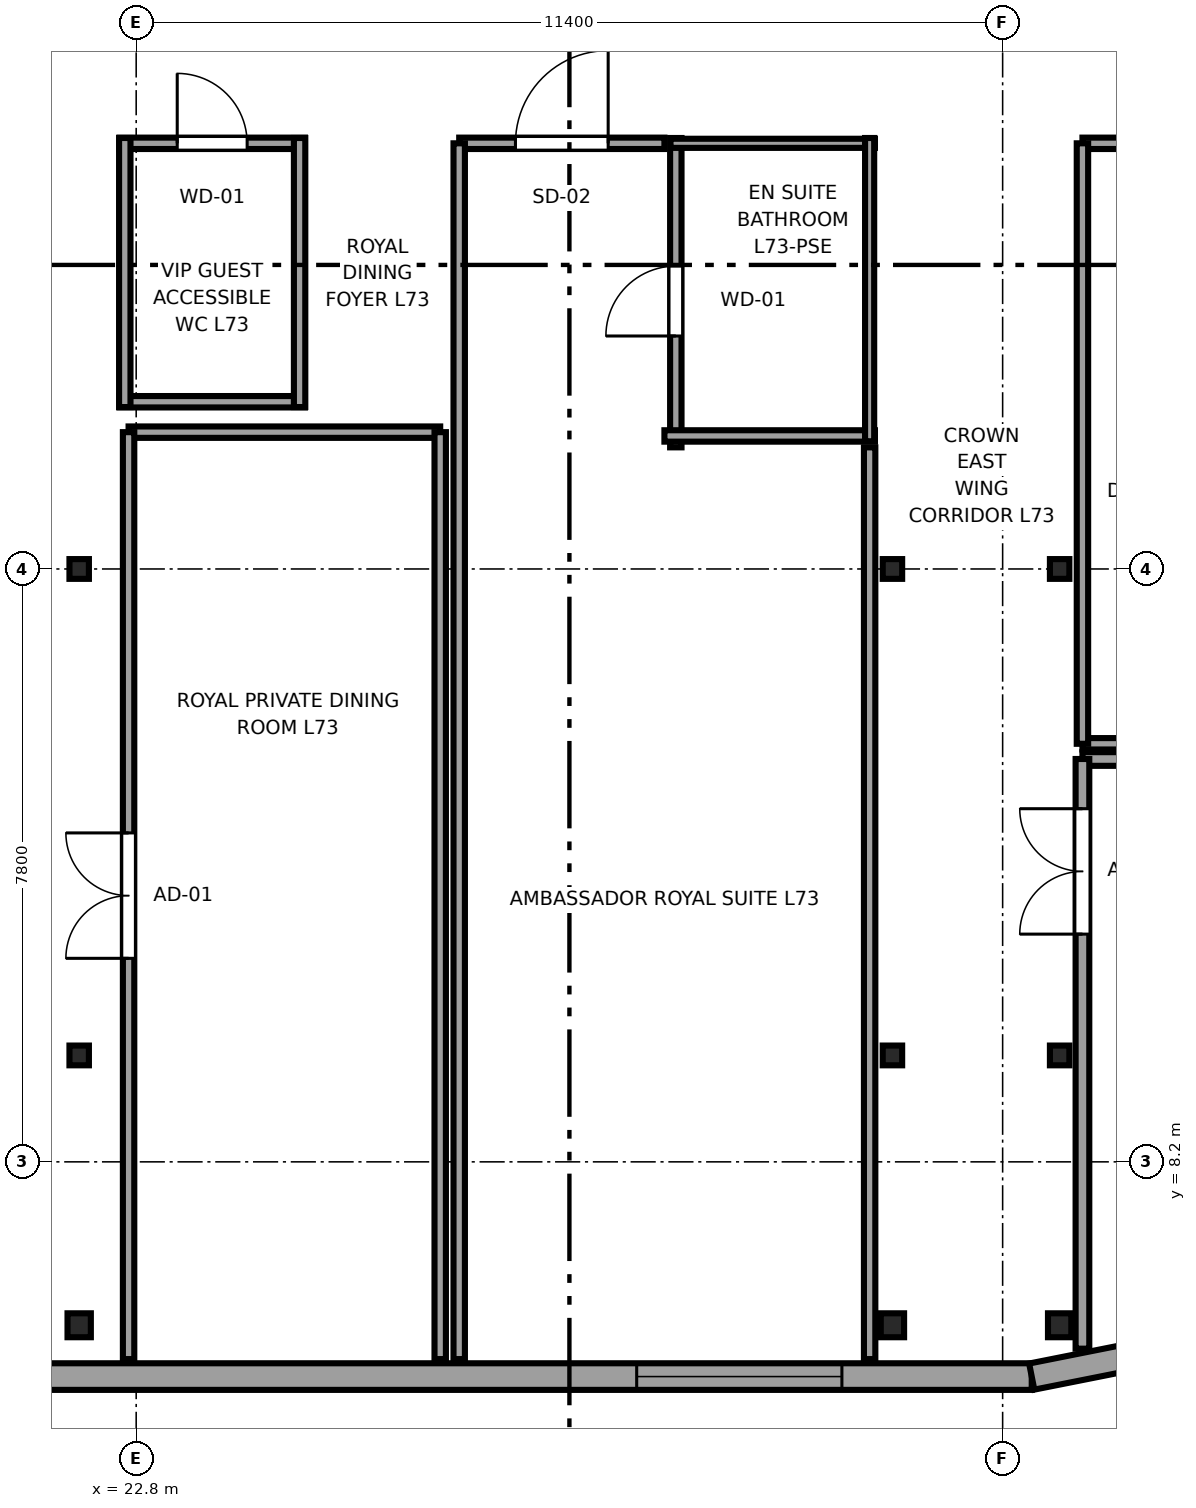
"""IFC4 building model, lengths in metres.
Left out: names, types, materials, properties, quantities, classifications, styles, units other than length and angle.
Written with IfcOpenShell. Run it as: python <this file> out.ifc"""

import sys

from ifc_helpers import new_model, si_unit, direction, frame, frame_2d, origin, origin_2d, place, context, subcontext, project, spatial, rectangle, i_section, extrude, source, transform, mapped, element, fill, save


model = new_model("IFC4")
c1 = context("Model", 3, precision=1e-05, world=origin(), true_north=direction((0.0, 1.0)))
c2 = subcontext(c1, "Body", "Model", "MODEL_VIEW")
j1 = project(units=[si_unit("LENGTHUNIT", "METRE"), si_unit("PLANEANGLEUNIT", "RADIAN")], contexts=[c1])
p1 = place(None, origin())
s1 = spatial("IfcSite", under=j1, at=p1, CompositionType="ELEMENT")
p2 = place(p1, origin())
s2 = spatial("IfcBuilding", under=s1, at=p2, CompositionType="ELEMENT")
p3 = place(p2, frame((0.0, 0.0, 275.05)))
s3 = spatial("IfcBuildingStorey", under=s2, at=p3, CompositionType="ELEMENT", Elevation=275.05)
m1 = source(origin(), c2, "Body", "SweptSolid", [
    extrude(i_section(OverallWidth=0.307, OverallDepth=0.315, WebThickness=0.012, FlangeThickness=0.019, FilletRadius=0.017, at=origin_2d()), origin(), (0.0, 0.0, 1.0), 3.55),
])
p4 = place(p3, frame((22.05, 6.05, 0.0), z_axis=(0.0, 0.0, 1.0), x_axis=(1.0, 0.0, 0.0)))
e1 = element("IfcColumn", 1, at=p4, inside=s3, PredefinedType="COLUMN", context=c2, shape_type="MappedRepresentation", body=[
    mapped(m1, transform((0.0, 0.0, 0.0), x_axis=(1.0, 0.0, 0.0), y_axis=(0.0, 1.0, 0.0), z_axis=(0.0, 0.0, 1.0), scale=1.0)),
])
m2 = source(origin(), c2, "Body", "SweptSolid", [
    extrude(i_section(OverallWidth=0.256, OverallDepth=0.26, WebThickness=0.01, FlangeThickness=0.017, FilletRadius=0.014, at=origin_2d()), origin(), (0.0, 0.0, 1.0), 3.55),
])
for number, where, z_axis, x_axis in (
    (2, (22.05, 9.6, 0.0), (0.0, 0.0, 1.0), (1.0, 0.0, 0.0)),
    (3, (22.05, 16.0, 0.0), (0.0, 0.0, 1.0), (1.0, 0.0, 0.0)),
):
    element("IfcColumn", number, at=place(p3, frame(where, z_axis=z_axis, x_axis=x_axis)), inside=s3, PredefinedType="COLUMN", context=c2, shape_type="MappedRepresentation", body=[
        mapped(m2, transform((0.0, 0.0, 0.0), x_axis=(1.0, 0.0, 0.0), y_axis=(0.0, 1.0, 0.0), z_axis=(0.0, 0.0, 1.0), scale=1.0)),
    ])
p5 = place(p3, frame((32.75, 6.05, 0.0), z_axis=(0.0, 0.0, 1.0), x_axis=(1.0, 0.0, 0.0)))
e4 = element("IfcColumn", 4, at=p5, inside=s3, PredefinedType="COLUMN", context=c2, shape_type="MappedRepresentation", body=[
    mapped(m1, transform((0.0, 0.0, 0.0), x_axis=(1.0, 0.0, 0.0), y_axis=(0.0, 1.0, 0.0), z_axis=(0.0, 0.0, 1.0), scale=1.0)),
])
for number, where, z_axis, x_axis in (
    (5, (32.75, 9.6, 0.0), (0.0, 0.0, 1.0), (1.0, 0.0, 0.0)),
    (6, (32.75, 16.0, 0.0), (0.0, 0.0, 1.0), (1.0, 0.0, 0.0)),
):
    element("IfcColumn", number, at=place(p3, frame(where, z_axis=z_axis, x_axis=x_axis)), inside=s3, PredefinedType="COLUMN", context=c2, shape_type="MappedRepresentation", body=[
        mapped(m2, transform((0.0, 0.0, 0.0), x_axis=(1.0, 0.0, 0.0), y_axis=(0.0, 1.0, 0.0), z_axis=(0.0, 0.0, 1.0), scale=1.0)),
    ])
p6 = place(p3, frame((34.95, 6.05, 0.0), z_axis=(0.0, 0.0, 1.0), x_axis=(1.0, 0.0, 0.0)))
e7 = element("IfcColumn", 7, at=p6, inside=s3, PredefinedType="COLUMN", context=c2, shape_type="MappedRepresentation", body=[
    mapped(m1, transform((0.0, 0.0, 0.0), x_axis=(1.0, 0.0, 0.0), y_axis=(0.0, 1.0, 0.0), z_axis=(0.0, 0.0, 1.0), scale=1.0)),
])
for number, where, z_axis, x_axis in (
    (8, (34.95, 9.6, 0.0), (0.0, 0.0, 1.0), (1.0, 0.0, 0.0)),
    (9, (34.95, 16.0, 0.0), (0.0, 0.0, 1.0), (1.0, 0.0, 0.0)),
):
    element("IfcColumn", number, at=place(p3, frame(where, z_axis=z_axis, x_axis=x_axis)), inside=s3, PredefinedType="COLUMN", context=c2, shape_type="MappedRepresentation", body=[
        mapped(m2, transform((0.0, 0.0, 0.0), x_axis=(1.0, 0.0, 0.0), y_axis=(0.0, 1.0, 0.0), z_axis=(0.0, 0.0, 1.0), scale=1.0)),
    ])
p7 = place(p3, frame((7.017, 5.375, 0.0), z_axis=(0.0, 0.0, 1.0), x_axis=(1.0, 0.0, 0.0)))
e10 = element("IfcWall", 10, at=p7, inside=s3, PredefinedType="SOLIDWALL", context=c2, shape_type="SweptSolid", body=[
    extrude(rectangle(XDim=27.566, YDim=0.35, at=frame_2d((13.783, 0.0))), origin(), (0.0, 0.0, 1.0), 3.33),
])
p8 = place(p7, frame((0.897, 0.0, 0.68)))
e11 = element("IfcOpeningElement", 11, at=p8, cuts=e10, PredefinedType="OPENING", context=c2, shape_type="SweptSolid", body=[
    extrude(rectangle(XDim=2.7, YDim=1.95, at=frame_2d((1.35, 0.975))), frame((0.0, 0.185, 0.0), z_axis=(0.0, -1.0, 0.0), x_axis=(1.0, 0.0, 0.0)), (0.0, 0.0, 1.0), 0.37),
])
p9 = place(p7, frame((4.791, 0.0, 0.68)))
e12 = element("IfcOpeningElement", 12, at=p9, cuts=e10, PredefinedType="OPENING", context=c2, shape_type="SweptSolid", body=[
    extrude(rectangle(XDim=2.7, YDim=1.95, at=frame_2d((1.35, 0.975))), frame((0.0, 0.185, 0.0), z_axis=(0.0, -1.0, 0.0), x_axis=(1.0, 0.0, 0.0)), (0.0, 0.0, 1.0), 0.37),
])
p10 = place(p7, frame((10.236, 0.0, 0.68)))
e13 = element("IfcOpeningElement", 13, at=p10, cuts=e10, PredefinedType="OPENING", context=c2, shape_type="SweptSolid", body=[
    extrude(rectangle(XDim=2.7, YDim=1.95, at=frame_2d((1.35, 0.975))), frame((0.0, 0.185, 0.0), z_axis=(0.0, -1.0, 0.0), x_axis=(1.0, 0.0, 0.0)), (0.0, 0.0, 1.0), 0.37),
])
p11 = place(p7, frame((22.368, 0.0, 0.68)))
e14 = element("IfcOpeningElement", 14, at=p11, cuts=e10, PredefinedType="OPENING", context=c2, shape_type="SweptSolid", body=[
    extrude(rectangle(XDim=2.7, YDim=1.95, at=frame_2d((1.35, 0.975))), frame((0.0, 0.185, 0.0), z_axis=(0.0, -1.0, 0.0), x_axis=(1.0, 0.0, 0.0)), (0.0, 0.0, 1.0), 0.37),
])
p12 = place(p3, frame((34.583, 5.375, 0.0), z_axis=(0.0, 0.0, 1.0), x_axis=(0.980794424524, 0.195044345786, 0.0)))
e15 = element("IfcWall", 15, at=p12, inside=s3, PredefinedType="SOLIDWALL", context=c2, shape_type="SweptSolid", body=[
    extrude(rectangle(XDim=1.665, YDim=0.35, at=frame_2d((0.833, 0.0))), origin(), (0.0, 0.0, 1.0), 3.33),
])
p13 = place(p3, frame((29.9, 17.6, 0.0), z_axis=(0.0, 0.0, 1.0), x_axis=(0.0, 1.0, 0.0)))
e16 = element("IfcWall", 16, at=p13, inside=s3, PredefinedType="PARTITIONING", context=c2, shape_type="SweptSolid", body=[
    extrude(rectangle(XDim=4.07, YDim=0.15, at=frame_2d((2.035, 0.0))), origin(), (0.0, 0.0, 1.0), 3.33),
])
p14 = place(p13, frame((1.465, 0.0, 0.0)))
e17 = element("IfcOpeningElement", 17, at=p14, cuts=e16, PredefinedType="OPENING", context=c2, shape_type="SweptSolid", body=[
    extrude(rectangle(XDim=0.92, YDim=2.01, at=frame_2d((0.46, 1.005))), frame((0.0, 0.085, 0.0), z_axis=(0.0, -1.0, 0.0), x_axis=(1.0, 0.0, 0.0)), (0.0, 0.0, 1.0), 0.17),
])
p15 = place(p3, frame((29.75, 17.75, 0.0), z_axis=(0.0, 0.0, 1.0), x_axis=(1.0, 0.0, 0.0)))
e18 = element("IfcWall", 18, at=p15, inside=s3, PredefinedType="PARTITIONING", context=c2, shape_type="SweptSolid", body=[
    extrude(rectangle(XDim=2.77, YDim=0.15, at=frame_2d((1.385, 0.0))), origin(), (0.0, 0.0, 1.0), 3.33),
])
p16 = place(p3, frame((29.83, 21.6, 0.0), z_axis=(0.0, 0.0, 1.0), x_axis=(1.0, 0.0, 0.0)))
e19 = element("IfcWall", 19, at=p16, inside=s3, PredefinedType="PLUMBINGWALL", context=c2, shape_type="SweptSolid", body=[
    extrude(rectangle(XDim=2.69, YDim=0.12, at=frame_2d((1.345, 0.0))), origin(), (0.0, 0.0, 1.0), 3.33),
])
p17 = place(p3, frame((32.45, 17.68, 0.0), z_axis=(0.0, 0.0, 1.0), x_axis=(0.0, 1.0, 0.0)))
e20 = element("IfcWall", 20, at=p17, inside=s3, PredefinedType="PLUMBINGWALL", context=c2, shape_type="SweptSolid", body=[
    extrude(rectangle(XDim=3.99, YDim=0.12, at=frame_2d((1.995, 0.0))), origin(), (0.0, 0.0, 1.0), 3.33),
])
p18 = place(p3, frame((22.7, 17.8, 0.0), z_axis=(0.0, 0.0, 1.0), x_axis=(1.0, 0.0, 0.0)))
e21 = element("IfcWall", 21, at=p18, inside=s3, PredefinedType="PARTITIONING", context=c2, shape_type="SweptSolid", body=[
    extrude(rectangle(XDim=4.1, YDim=0.15, at=frame_2d((2.05, 0.0))), origin(), (0.0, 0.0, 1.0), 3.33),
])
p19 = place(p3, frame((22.7, 5.605, 0.0), z_axis=(0.0, 0.0, 1.0), x_axis=(0.0, 1.0, 0.0)))
e22 = element("IfcWall", 22, at=p19, inside=s3, PredefinedType="PARTITIONING", context=c2, shape_type="SweptSolid", body=[
    extrude(rectangle(XDim=12.195, YDim=0.15, at=frame_2d((6.098, 0.0))), origin(), (0.0, 0.0, 1.0), 3.33),
])
p20 = place(p19, frame((5.272, 0.0, 0.0)))
e23 = element("IfcOpeningElement", 23, at=p20, cuts=e22, PredefinedType="OPENING", context=c2, shape_type="SweptSolid", body=[
    extrude(rectangle(XDim=1.65, YDim=2.15, at=frame_2d((0.825, 1.075))), frame((0.0, 0.085, 0.0), z_axis=(0.0, -1.0, 0.0), x_axis=(1.0, 0.0, 0.0)), (0.0, 0.0, 1.0), 0.17),
])
p21 = place(p3, frame((26.8, 5.605, 0.0), z_axis=(0.0, 0.0, 1.0), x_axis=(0.0, 1.0, 0.0)))
e24 = element("IfcWall", 24, at=p21, inside=s3, PredefinedType="PARTITIONING", context=c2, shape_type="SweptSolid", body=[
    extrude(rectangle(XDim=12.195, YDim=0.15, at=frame_2d((6.098, 0.0))), origin(), (0.0, 0.0, 1.0), 3.33),
])
p22 = place(p3, frame((27.05, 21.6, 0.0), z_axis=(0.0, 0.0, 1.0), x_axis=(1.0, 0.0, 0.0)))
e25 = element("IfcWall", 25, at=p22, inside=s3, PredefinedType="PARTITIONING", context=c2, shape_type="SweptSolid", body=[
    extrude(rectangle(XDim=2.7, YDim=0.15, at=frame_2d((1.35, 0.0))), origin(), (0.0, 0.0, 1.0), 3.33),
])
p23 = place(p22, frame((0.74, 0.0, 0.0)))
e26 = element("IfcOpeningElement", 26, at=p23, cuts=e25, PredefinedType="OPENING", context=c2, shape_type="SweptSolid", body=[
    extrude(rectangle(XDim=1.22, YDim=2.08, at=frame_2d((0.61, 1.04))), frame((0.0, 0.085, 0.0), z_axis=(0.0, -1.0, 0.0), x_axis=(1.0, 0.0, 0.0)), (0.0, 0.0, 1.0), 0.17),
])
p24 = place(p3, frame((32.45, 5.605, 0.0), z_axis=(0.0, 0.0, 1.0), x_axis=(0.0, 1.0, 0.0)))
e27 = element("IfcWall", 27, at=p24, inside=s3, PredefinedType="PARTITIONING", context=c2, shape_type="SweptSolid", body=[
    extrude(rectangle(XDim=11.995, YDim=0.15, at=frame_2d((5.998, 0.0))), origin(), (0.0, 0.0, 1.0), 3.33),
])
p25 = place(p3, frame((27.05, 5.605, 0.0), z_axis=(0.0, 0.0, 1.0), x_axis=(0.0, 1.0, 0.0)))
e28 = element("IfcWall", 28, at=p25, inside=s3, PredefinedType="PARTITIONING", context=c2, shape_type="SweptSolid", body=[
    extrude(rectangle(XDim=15.995, YDim=0.15, at=frame_2d((7.998, 0.0))), origin(), (0.0, 0.0, 1.0), 3.33),
])
p26 = place(p3, frame((35.25, 13.5, 0.0), z_axis=(0.0, 0.0, 1.0), x_axis=(1.0, 0.0, 0.0)))
e29 = element("IfcWall", 29, at=p26, inside=s3, PredefinedType="PARTITIONING", context=c2, shape_type="SweptSolid", body=[
    extrude(rectangle(XDim=3.345, YDim=0.18, at=frame_2d((1.672, 0.0))), origin(), (0.0, 0.0, 1.0), 3.33),
])
p27 = place(p3, frame((35.25, 5.742, 0.0), z_axis=(0.0, 0.0, 1.0), x_axis=(0.0, 1.0, 0.0)))
e30 = element("IfcWall", 30, at=p27, inside=s3, PredefinedType="PARTITIONING", context=c2, shape_type="SweptSolid", body=[
    extrude(rectangle(XDim=7.758, YDim=0.18, at=frame_2d((3.879, 0.0))), origin(), (0.0, 0.0, 1.0), 3.33),
])
p28 = place(p27, frame((5.454, 0.0, 0.0)))
e31 = element("IfcOpeningElement", 31, at=p28, cuts=e30, PredefinedType="OPENING", context=c2, shape_type="SweptSolid", body=[
    extrude(rectangle(XDim=1.65, YDim=2.15, at=frame_2d((0.825, 1.075))), frame((0.0, 0.1, 0.0), z_axis=(0.0, -1.0, 0.0), x_axis=(1.0, 0.0, 0.0)), (0.0, 0.0, 1.0), 0.2),
])
p29 = place(p3, frame((35.25, 13.7, 0.0), z_axis=(0.0, 0.0, 1.0), x_axis=(1.0, 0.0, 0.0)))
e32 = element("IfcWall", 32, at=p29, inside=s3, PredefinedType="PARTITIONING", context=c2, shape_type="SweptSolid", body=[
    extrude(rectangle(XDim=3.345, YDim=0.15, at=frame_2d((1.672, 0.0))), origin(), (0.0, 0.0, 1.0), 3.33),
])
p30 = place(p3, frame((35.25, 21.6, 0.0), z_axis=(0.0, 0.0, 1.0), x_axis=(1.0, 0.0, 0.0)))
e33 = element("IfcWall", 33, at=p30, inside=s3, PredefinedType="PARTITIONING", context=c2, shape_type="SweptSolid", body=[
    extrude(rectangle(XDim=3.345, YDim=0.15, at=frame_2d((1.672, 0.0))), origin(), (0.0, 0.0, 1.0), 3.33),
])
p31 = place(p30, frame((1.062, 0.0, 0.0)))
e34 = element("IfcOpeningElement", 34, at=p31, cuts=e33, PredefinedType="OPENING", context=c2, shape_type="SweptSolid", body=[
    extrude(rectangle(XDim=1.22, YDim=2.08, at=frame_2d((0.61, 1.04))), frame((0.0, 0.085, 0.0), z_axis=(0.0, -1.0, 0.0), x_axis=(1.0, 0.0, 0.0)), (0.0, 0.0, 1.0), 0.17),
])
p32 = place(p3, frame((35.25, 13.7, 0.0), z_axis=(0.0, 0.0, 1.0), x_axis=(0.0, 1.0, 0.0)))
e35 = element("IfcWall", 35, at=p32, inside=s3, PredefinedType="PARTITIONING", context=c2, shape_type="SweptSolid", body=[
    extrude(rectangle(XDim=7.9, YDim=0.15, at=frame_2d((3.95, 0.0))), origin(), (0.0, 0.0, 1.0), 3.33),
])
p33 = place(p3, frame((22.58, 18.2, 0.0), z_axis=(0.0, 0.0, 1.0), x_axis=(1.0, 0.0, 0.0)))
e36 = element("IfcWall", 36, at=p33, inside=s3, PredefinedType="PARTITIONING", context=c2, shape_type="SweptSolid", body=[
    extrude(rectangle(XDim=2.44, YDim=0.15, at=frame_2d((1.22, 0.0))), origin(), (0.0, 0.0, 1.0), 3.33),
])
p34 = place(p3, frame((22.58, 21.6, 0.0), z_axis=(0.0, 0.0, 1.0), x_axis=(1.0, 0.0, 0.0)))
e37 = element("IfcWall", 37, at=p34, inside=s3, PredefinedType="PARTITIONING", context=c2, shape_type="SweptSolid", body=[
    extrude(rectangle(XDim=2.44, YDim=0.15, at=frame_2d((1.22, 0.0))), origin(), (0.0, 0.0, 1.0), 3.33),
])
p35 = place(p34, frame((0.76, 0.0, 0.0)))
e38 = element("IfcOpeningElement", 38, at=p35, cuts=e37, PredefinedType="OPENING", context=c2, shape_type="SweptSolid", body=[
    extrude(rectangle(XDim=0.92, YDim=2.01, at=frame_2d((0.46, 1.005))), frame((0.0, 0.085, 0.0), z_axis=(0.0, -1.0, 0.0), x_axis=(1.0, 0.0, 0.0)), (0.0, 0.0, 1.0), 0.17),
])
for number, where, z_axis, x_axis in (
    (39, (22.65, 18.13, 0.0), (0.0, 0.0, 1.0), (0.0, 1.0, 0.0)),
    (40, (24.95, 18.13, 0.0), (0.0, 0.0, 1.0), (0.0, 1.0, 0.0)),
):
    element("IfcWall", number, at=place(p3, frame(where, z_axis=z_axis, x_axis=x_axis)), inside=s3, PredefinedType="PARTITIONING", context=c2, shape_type="SweptSolid", body=[
        extrude(rectangle(XDim=3.54, YDim=0.15, at=frame_2d((1.77, 0.0))), origin(), (0.0, 0.0, 1.0), 3.33),
    ])
m3 = source(origin(), c2, "Body", "SweptSolid", [
    extrude(rectangle(XDim=2.7, YDim=1.95, at=frame_2d((1.35, 0.975))), frame((0.0, 0.09, 0.0), z_axis=(0.0, -1.0, 0.0), x_axis=(1.0, 0.0, 0.0)), (0.0, 0.0, 1.0), 0.06),
])
p36 = place(p11, origin())
e41 = element("IfcWindow", 41, at=p36, inside=s3, PartitioningType="TRIPLE_PANEL_HORIZONTAL", PredefinedType="WINDOW", context=c2, shape_type="MappedRepresentation", body=[
    mapped(m3, transform((0.0, 0.0, 0.0), x_axis=(1.0, 0.0, 0.0), y_axis=(0.0, 1.0, 0.0), z_axis=(0.0, 0.0, 1.0), scale=1.0)),
])
fill(e14, e41)
m4 = source(origin(), c2, "Body", "SweptSolid", [
    extrude(rectangle(XDim=0.92, YDim=2.01, at=frame_2d((0.46, 1.005))), frame((0.0, 0.025, 0.0), z_axis=(0.0, -1.0, 0.0), x_axis=(1.0, 0.0, 0.0)), (0.0, 0.0, 1.0), 0.05),
])
p37 = place(p14, origin())
e42 = element("IfcDoor", 42, at=p37, inside=s3, OperationType="SINGLE_SWING_LEFT", PredefinedType="DOOR", context=c2, shape_type="MappedRepresentation", body=[
    mapped(m4, transform((0.0, 0.0, 0.0), x_axis=(1.0, 0.0, 0.0), y_axis=(0.0, 1.0, 0.0), z_axis=(0.0, 0.0, 1.0), scale=1.0)),
])
fill(e17, e42)
m5 = source(origin(), c2, "Body", "SweptSolid", [
    extrude(rectangle(XDim=1.65, YDim=2.15, at=frame_2d((0.825, 1.075))), frame((0.0, 0.025, 0.0), z_axis=(0.0, -1.0, 0.0), x_axis=(1.0, 0.0, 0.0)), (0.0, 0.0, 1.0), 0.05),
])
p38 = place(p20, origin())
e43 = element("IfcDoor", 43, at=p38, inside=s3, OperationType="DOUBLE_DOOR_SINGLE_SWING", PredefinedType="DOOR", context=c2, shape_type="MappedRepresentation", body=[
    mapped(m5, transform((0.0, 0.0, 0.0), x_axis=(1.0, 0.0, 0.0), y_axis=(0.0, 1.0, 0.0), z_axis=(0.0, 0.0, 1.0), scale=1.0)),
])
fill(e23, e43)
m6 = source(origin(), c2, "Body", "SweptSolid", [
    extrude(rectangle(XDim=1.22, YDim=2.08, at=frame_2d((0.61, 1.04))), frame((0.0, 0.025, 0.0), z_axis=(0.0, -1.0, 0.0), x_axis=(1.0, 0.0, 0.0)), (0.0, 0.0, 1.0), 0.05),
])
p39 = place(p23, origin())
e44 = element("IfcDoor", 44, at=p39, inside=s3, OperationType="SINGLE_SWING_RIGHT", PredefinedType="DOOR", context=c2, shape_type="MappedRepresentation", body=[
    mapped(m6, transform((0.0, 0.0, 0.0), x_axis=(1.0, 0.0, 0.0), y_axis=(0.0, 1.0, 0.0), z_axis=(0.0, 0.0, 1.0), scale=1.0)),
])
fill(e26, e44)
p40 = place(p28, origin())
e45 = element("IfcDoor", 45, at=p40, inside=s3, OperationType="DOUBLE_DOOR_SINGLE_SWING", PredefinedType="DOOR", context=c2, shape_type="MappedRepresentation", body=[
    mapped(m5, transform((0.0, 0.0, 0.0), x_axis=(1.0, 0.0, 0.0), y_axis=(0.0, 1.0, 0.0), z_axis=(0.0, 0.0, 1.0), scale=1.0)),
])
fill(e31, e45)
p41 = place(p35, origin())
e46 = element("IfcDoor", 46, at=p41, inside=s3, OperationType="SINGLE_SWING_LEFT", PredefinedType="DOOR", context=c2, shape_type="MappedRepresentation", body=[
    mapped(m4, transform((0.0, 0.0, 0.0), x_axis=(1.0, 0.0, 0.0), y_axis=(0.0, 1.0, 0.0), z_axis=(0.0, 0.0, 1.0), scale=1.0)),
])
fill(e38, e46)
save(model, sys.argv[1])
